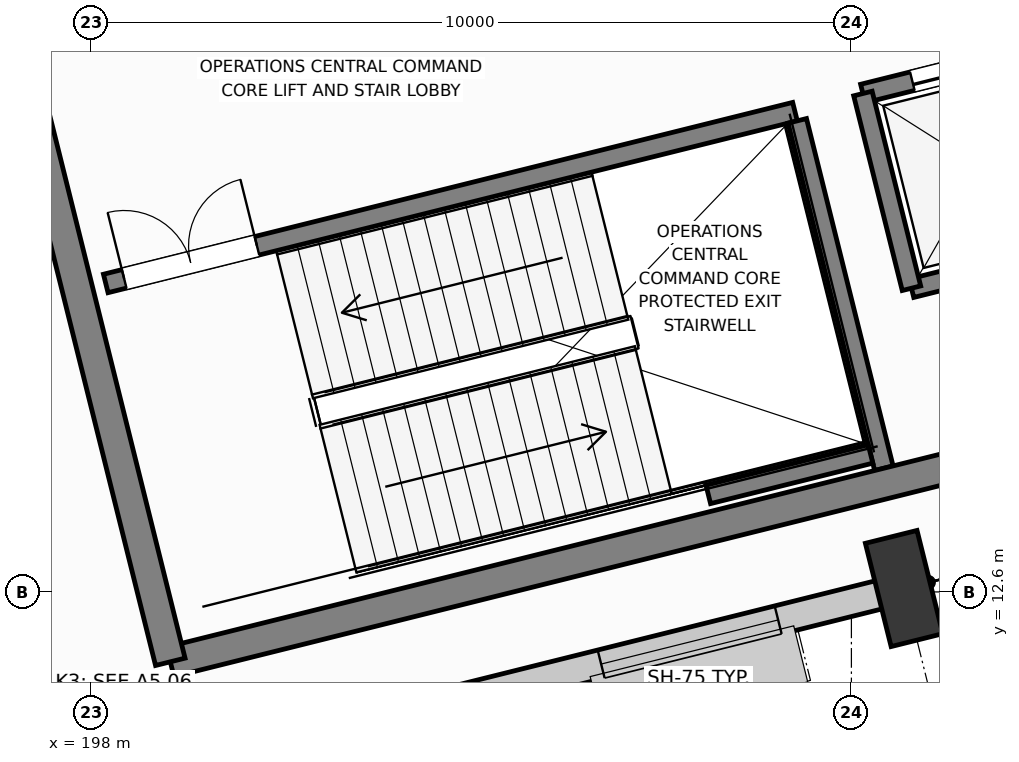
"""IFC4 building model, lengths in metres.
Left out: names, types, materials, properties, quantities, classifications, styles, units other than length and angle.
Written with IfcOpenShell. Run it as: python <this file> out.ifc"""

import sys

from ifc_helpers import new_model, si_unit, direction, frame, frame_2d, origin, origin_2d, place, context, subcontext, project, spatial, rectangle, extrude, element, fill, save


model = new_model("IFC4")
c1 = context("Model", 3, precision=1e-05, world=origin(), true_north=direction((0.0, 1.0)))
c2 = subcontext(c1, "Body", "Model", "MODEL_VIEW")
j1 = project(units=[si_unit("LENGTHUNIT", "METRE"), si_unit("PLANEANGLEUNIT", "RADIAN")], contexts=[c1])
p1 = place(None, origin())
s1 = spatial("IfcSite", under=j1, at=p1, CompositionType="ELEMENT")
p2 = place(p1, origin())
s2 = spatial("IfcBuilding", under=s1, at=p2, CompositionType="ELEMENT")
p3 = place(p2, frame((0.0, 0.0, 6.0)))
s3 = spatial("IfcBuildingStorey", under=s2, at=p3, CompositionType="ELEMENT", Elevation=6.0)
p4 = place(p3, frame((208.693, 12.645, 0.0), z_axis=(0.0, 0.0, 1.0), x_axis=(0.970295726276, 0.2419218956, 0.0)))
e1 = element("IfcColumn", 1, at=p4, inside=s3, PredefinedType="COLUMN", context=c2, shape_type="SweptSolid", body=[
    extrude(rectangle(XDim=0.7, YDim=1.4, at=origin_2d()), origin(), (0.0, 0.0, 1.0), 5.4),
])
p5 = place(p3, frame((198.326, 10.06, 0.0), z_axis=(0.0, 0.0, 1.0), x_axis=(0.970293766674, 0.241929755, 0.0)))
e2 = element("IfcWall", 2, at=p5, inside=s3, PredefinedType="STANDARD", context=c2, shape_type="SweptSolid", body=[
    extrude(rectangle(XDim=10.37, YDim=0.38, at=frame_2d((5.185, 0.0))), origin(), (0.0, 0.0, 1.0), 3.925),
])
p6 = place(p5, frame((1.393, 0.0, 0.85)))
e3 = element("IfcOpeningElement", 3, at=p6, cuts=e2, PredefinedType="OPENING", context=c2, shape_type="SweptSolid", body=[
    extrude(rectangle(XDim=2.4, YDim=1.8, at=frame_2d((1.2, 0.9))), frame((0.0, 0.2, 0.0), z_axis=(0.0, -1.0, 0.0), x_axis=(1.0, 0.0, 0.0)), (0.0, 0.0, 1.0), 0.4),
])
p7 = place(p5, frame((6.577, 0.0, 0.85)))
e4 = element("IfcOpeningElement", 4, at=p7, cuts=e2, PredefinedType="OPENING", context=c2, shape_type="SweptSolid", body=[
    extrude(rectangle(XDim=2.4, YDim=1.8, at=frame_2d((1.2, 0.9))), frame((0.0, 0.2, 0.0), z_axis=(0.0, -1.0, 0.0), x_axis=(1.0, 0.0, 0.0)), (0.0, 0.0, 1.0), 0.4),
])
p8 = place(p3, frame((208.79, 16.595, 0.0), z_axis=(0.0, 0.0, 1.0), x_axis=(0.97029284861, 0.241933436994, 0.0)))
e5 = element("IfcWall", 5, at=p8, inside=s3, PredefinedType="SOLIDWALL", context=c2, shape_type="SweptSolid", body=[
    extrude(rectangle(XDim=2.54, YDim=0.25, at=frame_2d((1.27, 0.0))), origin(), (0.0, 0.0, 1.0), 5.05),
])
p9 = place(p3, frame((210.616, 19.771, 0.0), z_axis=(0.0, 0.0, 1.0), x_axis=(-0.97029284861, -0.241933436994, 0.0)))
e6 = element("IfcWall", 6, at=p9, inside=s3, PredefinedType="SOLIDWALL", context=c2, shape_type="SweptSolid", body=[
    extrude(rectangle(XDim=2.54, YDim=0.25, at=frame_2d((1.27, 0.0))), origin(), (0.0, 0.0, 1.0), 5.05),
])
p10 = place(p9, frame((0.67, 0.0, 0.0)))
e7 = element("IfcOpeningElement", 7, at=p10, cuts=e6, PredefinedType="OPENING", context=c2, shape_type="SweptSolid", body=[
    extrude(rectangle(XDim=1.2, YDim=2.2, at=frame_2d((0.6, 1.1))), frame((0.0, 0.135, 0.0), z_axis=(0.0, -1.0, 0.0), x_axis=(1.0, 0.0, 0.0)), (0.0, 0.0, 1.0), 0.27),
])
p11 = place(p3, frame((208.151, 19.157, 0.0), z_axis=(0.0, 0.0, 1.0), x_axis=(0.241938414856, -0.970291607413, 0.0)))
e8 = element("IfcWall", 8, at=p11, inside=s3, PredefinedType="SOLIDWALL", context=c2, shape_type="SweptSolid", body=[
    extrude(rectangle(XDim=2.64, YDim=0.25, at=frame_2d((1.32, 0.0))), origin(), (0.0, 0.0, 1.0), 5.05),
])
p12 = place(p3, frame((198.19, 16.658, 0.0), z_axis=(0.0, 0.0, 1.0), x_axis=(0.970297151331, 0.241916179943, 0.0)))
e9 = element("IfcWall", 9, at=p12, inside=s3, PredefinedType="SOLIDWALL", context=c2, shape_type="SweptSolid", body=[
    extrude(rectangle(XDim=9.345, YDim=0.25, at=frame_2d((4.673, 0.0))), origin(), (0.0, 0.0, 1.0), 5.03),
])
p13 = place(p12, frame((0.25, 0.0, 0.0)))
e10 = element("IfcOpeningElement", 10, at=p13, cuts=e9, PredefinedType="OPENING", context=c2, shape_type="SweptSolid", body=[
    extrude(rectangle(XDim=1.8, YDim=2.25, at=frame_2d((0.9, 1.125))), frame((0.0, 0.135, 0.0), z_axis=(0.0, -1.0, 0.0), x_axis=(1.0, 0.0, 0.0)), (0.0, 0.0, 1.0), 0.27),
])
p14 = place(p3, frame((208.427, 14.227, 0.0), z_axis=(0.0, 0.0, 1.0), x_axis=(-0.241911120435, 0.970298412763, 0.0)))
e11 = element("IfcWall", 11, at=p14, inside=s3, PredefinedType="SOLIDWALL", context=c2, shape_type="SweptSolid", body=[
    extrude(rectangle(XDim=4.71, YDim=0.25, at=frame_2d((2.355, 0.0))), origin(), (0.0, 0.0, 1.0), 5.03),
])
p15 = place(p3, frame((206.117, 13.883, 0.0), z_axis=(0.0, 0.0, 1.0), x_axis=(0.97029738597, 0.241915238833, 0.0)))
e12 = element("IfcWall", 12, at=p15, inside=s3, PredefinedType="SOLIDWALL", context=c2, shape_type="SweptSolid", body=[
    extrude(rectangle(XDim=2.2, YDim=0.25, at=frame_2d((1.1, 0.0))), origin(), (0.0, 0.0, 1.0), 5.03),
])
p16 = place(p3, frame((199.04, 11.681, 0.0), z_axis=(0.0, 0.0, 1.0), x_axis=(0.970295578967, 0.241922486422, 0.0)))
e13 = element("IfcWall", 13, at=p16, inside=s3, PredefinedType="SHEAR", context=c2, shape_type="SweptSolid", body=[
    extrude(rectangle(XDim=14.2, YDim=0.4, at=frame_2d((7.1, 0.0))), origin(), (0.0, 0.0, 1.0), 5.05),
])
p17 = place(p3, frame((196.862, 20.413, 0.0), z_axis=(0.0, 0.0, 1.0), x_axis=(0.241921199913, -0.97029589973, 0.0)))
e14 = element("IfcWall", 14, at=p17, inside=s3, PredefinedType="SHEAR", context=c2, shape_type="SweptSolid", body=[
    extrude(rectangle(XDim=9.0, YDim=0.4, at=frame_2d((4.5, 0.0))), origin(), (0.0, 0.0, 1.0), 5.05),
])
p18 = place(p7, origin())
e15 = element("IfcWindow", 15, at=p18, inside=s3, PartitioningType="SINGLE_PANEL", PredefinedType="WINDOW", context=c2, shape_type="SweptSolid", body=[
    extrude(rectangle(XDim=2.4, YDim=1.8, at=frame_2d((1.2, 0.9))), frame((0.0, 0.03, 0.0), z_axis=(0.0, -1.0, 0.0), x_axis=(1.0, 0.0, 0.0)), (0.0, 0.0, 1.0), 0.06),
])
fill(e4, e15)
p19 = place(p10, origin())
e16 = element("IfcDoor", 16, at=p19, inside=s3, OperationType="SLIDING_TO_LEFT", PredefinedType="DOOR", context=c2, shape_type="SweptSolid", body=[
    extrude(rectangle(XDim=1.2, YDim=2.2, at=frame_2d((0.6, 1.1))), frame((0.0, 0.025, 0.0), z_axis=(0.0, -1.0, 0.0), x_axis=(1.0, 0.0, 0.0)), (0.0, 0.0, 1.0), 0.05),
])
fill(e7, e16)
p20 = place(p13, origin())
e17 = element("IfcDoor", 17, at=p20, inside=s3, OperationType="DOUBLE_DOOR_SINGLE_SWING", PredefinedType="DOOR", context=c2, shape_type="SweptSolid", body=[
    extrude(rectangle(XDim=1.8, YDim=2.25, at=frame_2d((0.9, 1.125))), frame((0.0, 0.025, 0.0), z_axis=(0.0, -1.0, 0.0), x_axis=(1.0, 0.0, 0.0)), (0.0, 0.0, 1.0), 0.05),
])
fill(e10, e17)
save(model, sys.argv[1])
